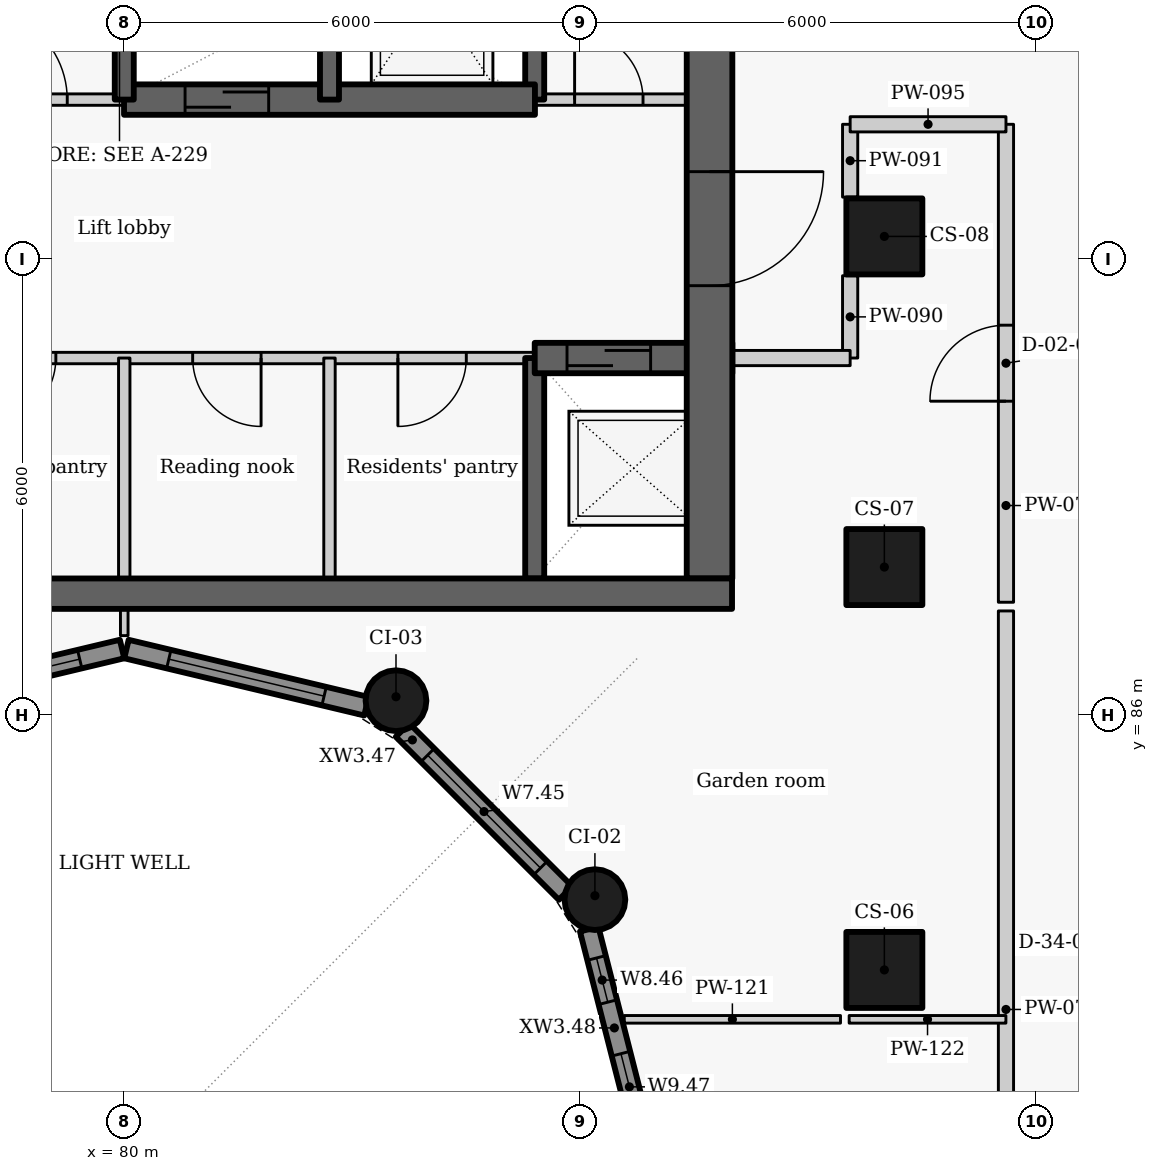
"""IFC4 building model, lengths in metres.
Left out: names, types, materials, properties, quantities, classifications, styles, units other than length and angle.
Written with IfcOpenShell. Run it as: python <this file> out.ifc"""

import sys

from ifc_helpers import new_model, si_unit, direction, frame, frame_2d, origin, origin_2d, place, context, subcontext, project, spatial, rectangle, circle, extrude, element, fill, save


model = new_model("IFC4")
c1 = context("Model", 3, precision=1e-05, world=origin(), true_north=direction((0.0, 1.0)))
c2 = subcontext(c1, "Body", "Model", "MODEL_VIEW")
j1 = project(units=[si_unit("LENGTHUNIT", "METRE"), si_unit("PLANEANGLEUNIT", "RADIAN")], contexts=[c1])
p1 = place(None, origin())
s1 = spatial("IfcSite", under=j1, at=p1, CompositionType="ELEMENT")
p2 = place(p1, origin())
s2 = spatial("IfcBuilding", under=s1, at=p2, CompositionType="ELEMENT")
p3 = place(p2, frame((0.0, 0.0, 166.8)))
s3 = spatial("IfcBuildingStorey", under=s2, at=p3, CompositionType="ELEMENT", Elevation=166.8)
for number, where, z_axis, x_axis in (
    (1, (90.0, 82.65, 0.0), (0.0, 0.0, 1.0), (0.0, 1.0, 0.0)),
    (2, (90.0, 87.95, 0.0), (0.0, 0.0, 1.0), (0.0, 1.0, 0.0)),
    (3, (90.0, 92.3, 0.0), (0.0, 0.0, 1.0), (0.0, 1.0, 0.0)),
):
    element("IfcColumn", number, at=place(p3, frame(where, z_axis=z_axis, x_axis=x_axis)), inside=s3, PredefinedType="COLUMN", context=c2, shape_type="SweptSolid", body=[
        extrude(rectangle(XDim=1.0, YDim=1.0, at=origin_2d()), origin(), (0.0, 0.0, 1.0), 3.3),
    ])
for number, where, z_axis, x_axis in (
    (4, (86.192, 83.575, 0.0), (0.0, 0.0, 1.0), (-0.5, 0.866, 0.0)),
    (5, (83.575, 86.192, 0.0), (0.0, 0.0, 1.0), (-0.866, 0.5, 0.0)),
):
    element("IfcColumn", number, at=place(p3, frame(where, z_axis=z_axis, x_axis=x_axis)), inside=s3, PredefinedType="COLUMN", context=c2, shape_type="SweptSolid", body=[
        extrude(circle(Radius=0.4, at=origin_2d()), origin(), (0.0, 0.0, 1.0), 3.3),
    ])
p4 = place(p3, frame((76.814, 86.119, 0.0), z_axis=(0.0, 0.0, 1.0), x_axis=(0.972773113459, 0.231759508395, 0.0)))
e6 = element("IfcWall", 6, at=p4, inside=s3, PredefinedType="SOLIDWALL", context=c2, shape_type="SweptSolid", body=[
    extrude(rectangle(XDim=3.246, YDim=0.25, at=frame_2d((1.623, 0.0))), origin(), (0.0, 0.0, 1.0), 2.05),
])
p5 = place(p4, frame((0.573, 0.0, 0.9)))
e7 = element("IfcOpeningElement", 7, at=p5, cuts=e6, PredefinedType="OPENING", context=c2, shape_type="SweptSolid", body=[
    extrude(rectangle(XDim=2.1, YDim=1.1, at=frame_2d((1.05, 0.55))), frame((0.0, 0.135, 0.0), z_axis=(0.0, -1.0, 0.0), x_axis=(1.0, 0.0, 0.0)), (0.0, 0.0, 1.0), 0.27),
])
p6 = place(p3, frame((80.029, 86.872, 0.0), z_axis=(0.0, 0.0, 1.0), x_axis=(0.972773113459, -0.231759508395, 0.0)))
e8 = element("IfcWall", 8, at=p6, inside=s3, PredefinedType="SOLIDWALL", context=c2, shape_type="SweptSolid", body=[
    extrude(rectangle(XDim=3.246, YDim=0.25, at=frame_2d((1.623, 0.0))), origin(), (0.0, 0.0, 1.0), 2.05),
])
p7 = place(p6, frame((0.573, 0.0, 0.9)))
e9 = element("IfcOpeningElement", 9, at=p7, cuts=e8, PredefinedType="OPENING", context=c2, shape_type="SweptSolid", body=[
    extrude(rectangle(XDim=2.1, YDim=1.1, at=frame_2d((1.05, 0.55))), frame((0.0, 0.135, 0.0), z_axis=(0.0, -1.0, 0.0), x_axis=(1.0, 0.0, 0.0)), (0.0, 0.0, 1.0), 0.27),
])
p8 = place(p3, frame((83.661, 85.806, 0.0), z_axis=(0.0, 0.0, 1.0), x_axis=(0.707106781187, -0.707106781187, 0.0)))
e10 = element("IfcWall", 10, at=p8, inside=s3, PredefinedType="SOLIDWALL", context=c2, shape_type="SweptSolid", body=[
    extrude(rectangle(XDim=3.033, YDim=0.25, at=frame_2d((1.517, 0.0))), origin(), (0.0, 0.0, 1.0), 2.05),
])
p9 = place(p8, frame((0.467, 0.0, 0.9)))
e11 = element("IfcOpeningElement", 11, at=p9, cuts=e10, PredefinedType="OPENING", context=c2, shape_type="SweptSolid", body=[
    extrude(rectangle(XDim=2.1, YDim=1.1, at=frame_2d((1.05, 0.55))), frame((0.0, 0.135, 0.0), z_axis=(0.0, -1.0, 0.0), x_axis=(1.0, 0.0, 0.0)), (0.0, 0.0, 1.0), 0.27),
])
p10 = place(p3, frame((86.117, 83.187, 0.0), z_axis=(0.0, 0.0, 1.0), x_axis=(0.247055971283, -0.969001211069, 0.0)))
e12 = element("IfcWall", 12, at=p10, inside=s3, PredefinedType="SOLIDWALL", context=c2, shape_type="SweptSolid", body=[
    extrude(rectangle(XDim=3.01, YDim=0.25, at=frame_2d((1.505, 0.0))), origin(), (0.0, 0.0, 1.0), 2.05),
])
p11 = place(p10, frame((0.392, 0.0, 0.9)))
e13 = element("IfcOpeningElement", 13, at=p11, cuts=e12, PredefinedType="OPENING", context=c2, shape_type="SweptSolid", body=[
    extrude(rectangle(XDim=0.6, YDim=1.1, at=frame_2d((0.3, 0.55))), frame((0.0, 0.135, 0.0), z_axis=(0.0, -1.0, 0.0), x_axis=(1.0, 0.0, 0.0)), (0.0, 0.0, 1.0), 0.27),
])
p12 = place(p10, frame((1.691, 0.0, 0.9)))
e14 = element("IfcOpeningElement", 14, at=p12, cuts=e12, PredefinedType="OPENING", context=c2, shape_type="SweptSolid", body=[
    extrude(rectangle(XDim=0.9, YDim=1.1, at=frame_2d((0.45, 0.55))), frame((0.0, 0.135, 0.0), z_axis=(0.0, -1.0, 0.0), x_axis=(1.0, 0.0, 0.0)), (0.0, 0.0, 1.0), 0.27),
])
p13 = place(p3, frame((85.4, 90.7, 0.0), z_axis=(0.0, 0.0, 1.0), x_axis=(-1.0, 0.0, 0.0)))
e15 = element("IfcWall", 15, at=p13, inside=s3, PredefinedType="PARTITIONING", context=c2, shape_type="SweptSolid", body=[
    extrude(rectangle(XDim=13.4, YDim=0.15, at=frame_2d((6.7, 0.0))), origin(), (0.0, 0.0, 1.0), 2.95),
])
p14 = place(p13, frame((11.325, 0.0, 0.0)))
e16 = element("IfcOpeningElement", 16, at=p14, cuts=e15, PredefinedType="OPENING", context=c2, shape_type="SweptSolid", body=[
    extrude(rectangle(XDim=0.9, YDim=2.1, at=frame_2d((0.45, 1.05))), frame((0.0, 0.085, 0.0), z_axis=(0.0, -1.0, 0.0), x_axis=(1.0, 0.0, 0.0)), (0.0, 0.0, 1.0), 0.17),
])
p15 = place(p13, frame((9.0, 0.0, 0.0)))
e17 = element("IfcOpeningElement", 17, at=p15, cuts=e15, PredefinedType="OPENING", context=c2, shape_type="SweptSolid", body=[
    extrude(rectangle(XDim=0.9, YDim=2.1, at=frame_2d((0.45, 1.05))), frame((0.0, 0.085, 0.0), z_axis=(0.0, -1.0, 0.0), x_axis=(1.0, 0.0, 0.0)), (0.0, 0.0, 1.0), 0.17),
])
p16 = place(p13, frame((6.3, 0.0, 0.0)))
e18 = element("IfcOpeningElement", 18, at=p16, cuts=e15, PredefinedType="OPENING", context=c2, shape_type="SweptSolid", body=[
    extrude(rectangle(XDim=0.9, YDim=2.1, at=frame_2d((0.45, 1.05))), frame((0.0, 0.085, 0.0), z_axis=(0.0, -1.0, 0.0), x_axis=(1.0, 0.0, 0.0)), (0.0, 0.0, 1.0), 0.17),
])
p17 = place(p13, frame((3.6, 0.0, 0.0)))
e19 = element("IfcOpeningElement", 19, at=p17, cuts=e15, PredefinedType="OPENING", context=c2, shape_type="SweptSolid", body=[
    extrude(rectangle(XDim=0.9, YDim=2.1, at=frame_2d((0.45, 1.05))), frame((0.0, 0.085, 0.0), z_axis=(0.0, -1.0, 0.0), x_axis=(1.0, 0.0, 0.0)), (0.0, 0.0, 1.0), 0.17),
])
p18 = place(p13, frame((0.9, 0.0, 0.0)))
e20 = element("IfcOpeningElement", 20, at=p18, cuts=e15, PredefinedType="OPENING", context=c2, shape_type="SweptSolid", body=[
    extrude(rectangle(XDim=0.9, YDim=2.1, at=frame_2d((0.45, 1.05))), frame((0.0, 0.085, 0.0), z_axis=(0.0, -1.0, 0.0), x_axis=(1.0, 0.0, 0.0)), (0.0, 0.0, 1.0), 0.17),
])
p19 = place(p3, frame((85.4, 87.8, -0.275), z_axis=(0.0, 0.0, 1.0), x_axis=(0.0, 1.0, 0.0)))
e21 = element("IfcWall", 21, at=p19, inside=s3, PredefinedType="SHEAR", context=c2, shape_type="SweptSolid", body=[
    extrude(rectangle(XDim=2.9, YDim=0.25, at=frame_2d((1.45, 0.0))), origin(), (0.0, 0.0, 1.0), 3.225),
])
p20 = place(p3, frame((85.4, 94.1, -0.275), z_axis=(0.0, 0.0, 1.0), x_axis=(0.0, 1.0, 0.0)))
e22 = element("IfcWall", 22, at=p20, inside=s3, PredefinedType="SHEAR", context=c2, shape_type="SweptSolid", body=[
    extrude(rectangle(XDim=2.8, YDim=0.25, at=frame_2d((1.4, 0.0))), origin(), (0.0, 0.0, 1.0), 3.225),
])
p21 = place(p3, frame((85.4, 90.7, -0.275), z_axis=(0.0, 0.0, 1.0), x_axis=(1.0, 0.0, 0.0)))
e23 = element("IfcWall", 23, at=p21, inside=s3, PredefinedType="SHEAR", context=c2, shape_type="SweptSolid", body=[
    extrude(rectangle(XDim=2.6, YDim=0.4, at=frame_2d((1.3, 0.0))), origin(), (0.0, 0.0, 1.0), 3.225),
])
p22 = place(p21, frame((0.425, 0.0, 0.275)))
e24 = element("IfcOpeningElement", 24, at=p22, cuts=e23, PredefinedType="OPENING", context=c2, shape_type="SweptSolid", body=[
    extrude(rectangle(XDim=1.1, YDim=2.1, at=frame_2d((0.55, 1.05))), frame((0.0, 0.21, 0.0), z_axis=(0.0, -1.0, 0.0), x_axis=(1.0, 0.0, 0.0)), (0.0, 0.0, 1.0), 0.42),
])
p23 = place(p3, frame((87.7, 103.4, -0.275), z_axis=(0.0, 0.0, 1.0), x_axis=(0.0, -1.0, 0.0)))
e25 = element("IfcWall", 25, at=p23, inside=s3, PredefinedType="SHEAR", context=c2, shape_type="SweptSolid", body=[
    extrude(rectangle(XDim=15.6, YDim=0.6, at=frame_2d((7.8, 0.0))), origin(), (0.0, 0.0, 1.0), 3.225),
])
p24 = place(p23, frame((10.248, 0.0, 0.275)))
e26 = element("IfcOpeningElement", 26, at=p24, cuts=e25, PredefinedType="OPENING", context=c2, shape_type="SweptSolid", body=[
    extrude(rectangle(XDim=1.5, YDim=2.1, at=frame_2d((0.75, 1.05))), frame((0.0, 0.31, 0.0), z_axis=(0.0, -1.0, 0.0), x_axis=(1.0, 0.0, 0.0)), (0.0, 0.0, 1.0), 0.62),
])
for number, where, z_axis, x_axis in (
    (27, (80.0, 87.8, 0.0), (0.0, 0.0, 1.0), (0.0, 1.0, 0.0)),
    (28, (82.7, 87.8, 0.0), (0.0, 0.0, 1.0), (0.0, 1.0, 0.0)),
):
    element("IfcWall", number, at=place(p3, frame(where, z_axis=z_axis, x_axis=x_axis)), inside=s3, PredefinedType="PARTITIONING", context=c2, shape_type="SweptSolid", body=[
        extrude(rectangle(XDim=2.9, YDim=0.15, at=frame_2d((1.45, 0.0))), origin(), (0.0, 0.0, 1.0), 2.95),
    ])
p25 = place(p3, frame((77.297, 94.1, 0.0), z_axis=(0.0, 0.0, 1.0), x_axis=(1.0, 0.0, 0.0)))
e29 = element("IfcWall", 29, at=p25, inside=s3, PredefinedType="PARTITIONING", context=c2, shape_type="SweptSolid", body=[
    extrude(rectangle(XDim=2.706, YDim=0.15, at=frame_2d((1.353, 0.0))), origin(), (0.0, 0.0, 1.0), 2.95),
])
p26 = place(p25, frame((0.753, 0.0, 0.0)))
e30 = element("IfcOpeningElement", 30, at=p26, cuts=e29, PredefinedType="OPENING", context=c2, shape_type="SweptSolid", body=[
    extrude(rectangle(XDim=1.2, YDim=2.1, at=frame_2d((0.6, 1.05))), frame((0.0, 0.085, 0.0), z_axis=(0.0, -1.0, 0.0), x_axis=(1.0, 0.0, 0.0)), (0.0, 0.0, 1.0), 0.17),
])
p27 = place(p3, frame((85.397, 94.1, 0.0), z_axis=(0.0, 0.0, 1.0), x_axis=(1.0, 0.0, 0.0)))
e31 = element("IfcWall", 31, at=p27, inside=s3, PredefinedType="PARTITIONING", context=c2, shape_type="SweptSolid", body=[
    extrude(rectangle(XDim=2.603, YDim=0.15, at=frame_2d((1.302, 0.0))), origin(), (0.0, 0.0, 1.0), 2.95),
])
p28 = place(p27, frame((0.528, 0.0, 0.0)))
e32 = element("IfcOpeningElement", 32, at=p28, cuts=e31, PredefinedType="OPENING", context=c2, shape_type="SweptSolid", body=[
    extrude(rectangle(XDim=0.9, YDim=2.1, at=frame_2d((0.45, 1.05))), frame((0.0, 0.085, 0.0), z_axis=(0.0, -1.0, 0.0), x_axis=(1.0, 0.0, 0.0)), (0.0, 0.0, 1.0), 0.17),
])
p29 = place(p3, frame((79.997, 94.1, -0.275), z_axis=(0.0, 0.0, 1.0), x_axis=(1.0, 0.0, 0.0)))
e33 = element("IfcWall", 33, at=p29, inside=s3, PredefinedType="SHEAR", context=c2, shape_type="SweptSolid", body=[
    extrude(rectangle(XDim=5.406, YDim=0.4, at=frame_2d((2.703, 0.0))), origin(), (0.0, 0.0, 1.0), 3.225),
])
p30 = place(p29, frame((0.803, 0.0, 0.275)))
e34 = element("IfcOpeningElement", 34, at=p30, cuts=e33, PredefinedType="OPENING", context=c2, shape_type="SweptSolid", body=[
    extrude(rectangle(XDim=1.1, YDim=2.1, at=frame_2d((0.55, 1.05))), frame((0.0, 0.21, 0.0), z_axis=(0.0, -1.0, 0.0), x_axis=(1.0, 0.0, 0.0)), (0.0, 0.0, 1.0), 0.42),
])
for number, where, z_axis, x_axis in (
    (35, (80.0, 94.1, -0.275), (0.0, 0.0, 1.0), (0.0, 1.0, 0.0)),
    (36, (82.7, 94.1, -0.275), (0.0, 0.0, 1.0), (0.0, 1.0, 0.0)),
):
    element("IfcWall", number, at=place(p3, frame(where, z_axis=z_axis, x_axis=x_axis)), inside=s3, PredefinedType="SHEAR", context=c2, shape_type="SweptSolid", body=[
        extrude(rectangle(XDim=2.8, YDim=0.25, at=frame_2d((1.4, 0.0))), origin(), (0.0, 0.0, 1.0), 3.225),
    ])
p31 = place(p3, frame((91.6, 76.887, 0.0), z_axis=(0.0, 0.0, 1.0), x_axis=(0.0, 1.0, 0.0)))
e37 = element("IfcWall", 37, at=p31, inside=s3, PredefinedType="PARTITIONING", context=c2, shape_type="SweptSolid", body=[
    extrude(rectangle(XDim=10.486, YDim=0.2, at=frame_2d((5.243, 0.0))), origin(), (0.0, 0.0, 1.0), 2.95),
])
p32 = place(p3, frame((91.6, 87.487, 0.0), z_axis=(0.0, 0.0, 1.0), x_axis=(0.0, 1.0, 0.0)))
e38 = element("IfcWall", 38, at=p32, inside=s3, PredefinedType="PARTITIONING", context=c2, shape_type="SweptSolid", body=[
    extrude(rectangle(XDim=6.288, YDim=0.2, at=frame_2d((3.144, 0.0))), origin(), (0.0, 0.0, 1.0), 2.95),
])
p33 = place(p32, frame((2.645, 0.0, 0.0)))
e39 = element("IfcOpeningElement", 39, at=p33, cuts=e38, PredefinedType="OPENING", context=c2, shape_type="SweptSolid", body=[
    extrude(rectangle(XDim=1.0, YDim=2.1, at=frame_2d((0.5, 1.05))), frame((0.0, 0.11, 0.0), z_axis=(0.0, -1.0, 0.0), x_axis=(1.0, 0.0, 0.0)), (0.0, 0.0, 1.0), 0.22),
])
p34 = place(p3, frame((89.55, 90.7, 0.0), z_axis=(0.0, 0.0, 1.0), x_axis=(0.0, 1.0, 0.0)))
e40 = element("IfcWall", 40, at=p34, inside=s3, PredefinedType="PARTITIONING", context=c2, shape_type="SweptSolid", body=[
    extrude(rectangle(XDim=1.083, YDim=0.2, at=frame_2d((0.542, 0.0))), origin(), (0.0, 0.0, 1.0), 2.43),
])
p35 = place(p3, frame((89.55, 92.817, 0.0), z_axis=(0.0, 0.0, 1.0), x_axis=(0.0, 1.0, 0.0)))
e41 = element("IfcWall", 41, at=p35, inside=s3, PredefinedType="PARTITIONING", context=c2, shape_type="SweptSolid", body=[
    extrude(rectangle(XDim=0.958, YDim=0.2, at=frame_2d((0.479, 0.0))), origin(), (0.0, 0.0, 1.0), 2.95),
])
p36 = place(p3, frame((89.55, 93.775, 0.0), z_axis=(0.0, 0.0, 1.0), x_axis=(1.0, 0.0, 0.0)))
e42 = element("IfcWall", 42, at=p36, inside=s3, PredefinedType="PARTITIONING", context=c2, shape_type="SweptSolid", body=[
    extrude(rectangle(XDim=2.05, YDim=0.2, at=frame_2d((1.025, 0.0))), origin(), (0.0, 0.0, 1.0), 2.43),
])
p37 = place(p3, frame((88.0, 90.7, 0.0), z_axis=(0.0, 0.0, 1.0), x_axis=(1.0, 0.0, 0.0)))
e43 = element("IfcWall", 43, at=p37, inside=s3, PredefinedType="PARTITIONING", context=c2, shape_type="SweptSolid", body=[
    extrude(rectangle(XDim=1.55, YDim=0.2, at=frame_2d((0.775, 0.0))), origin(), (0.0, 0.0, 1.0), 2.95),
])
p38 = place(p3, frame((80.0, 87.048, 0.0), z_axis=(0.0, 0.0, 1.0), x_axis=(0.0, 1.0, 0.0)))
e44 = element("IfcWall", 44, at=p38, inside=s3, PredefinedType="PARTITIONING", context=c2, shape_type="SweptSolid", body=[
    extrude(rectangle(XDim=0.352, YDim=0.1, at=frame_2d((0.176, 0.0))), origin(), (0.0, 0.0, 1.0), 2.95),
])
p39 = place(p3, frame((86.578, 82.0, 0.0), z_axis=(0.0, 0.0, 1.0), x_axis=(1.0, 0.0, 0.0)))
e45 = element("IfcWall", 45, at=p39, inside=s3, PredefinedType="PARTITIONING", context=c2, shape_type="SweptSolid", body=[
    extrude(rectangle(XDim=2.845, YDim=0.1, at=frame_2d((1.422, 0.0))), origin(), (0.0, 0.0, 1.0), 2.95),
])
p40 = place(p3, frame((89.537, 82.0, 0.0), z_axis=(0.0, 0.0, 1.0), x_axis=(1.0, 0.0, 0.0)))
e46 = element("IfcWall", 46, at=p40, inside=s3, PredefinedType="PARTITIONING", context=c2, shape_type="SweptSolid", body=[
    extrude(rectangle(XDim=2.062, YDim=0.1, at=frame_2d((1.031, 0.0))), origin(), (0.0, 0.0, 1.0), 2.43),
])
p41 = place(p3, frame((72.004, 87.6, -0.275), z_axis=(0.0, 0.0, 1.0), x_axis=(1.0, 0.0, 0.0)))
e47 = element("IfcWall", 47, at=p41, inside=s3, PredefinedType="SHEAR", context=c2, shape_type="SweptSolid", body=[
    extrude(rectangle(XDim=15.992, YDim=0.4, at=frame_2d((7.996, 0.0))), origin(), (0.0, 0.0, 1.0), 3.225),
])
p42 = place(p5, origin())
e48 = element("IfcWindow", 48, at=p42, inside=s3, PartitioningType="SINGLE_PANEL", PredefinedType="WINDOW", context=c2, shape_type="SweptSolid", body=[
    extrude(rectangle(XDim=2.1, YDim=1.1, at=frame_2d((1.05, 0.55))), frame((0.0, 0.03, 0.0), z_axis=(0.0, -1.0, 0.0), x_axis=(1.0, 0.0, 0.0)), (0.0, 0.0, 1.0), 0.06),
])
fill(e7, e48)
p43 = place(p7, origin())
e49 = element("IfcWindow", 49, at=p43, inside=s3, PartitioningType="SINGLE_PANEL", PredefinedType="WINDOW", context=c2, shape_type="SweptSolid", body=[
    extrude(rectangle(XDim=2.1, YDim=1.1, at=frame_2d((1.05, 0.55))), frame((0.0, 0.03, 0.0), z_axis=(0.0, -1.0, 0.0), x_axis=(1.0, 0.0, 0.0)), (0.0, 0.0, 1.0), 0.06),
])
fill(e9, e49)
p44 = place(p9, origin())
e50 = element("IfcWindow", 50, at=p44, inside=s3, PartitioningType="SINGLE_PANEL", PredefinedType="WINDOW", context=c2, shape_type="SweptSolid", body=[
    extrude(rectangle(XDim=2.1, YDim=1.1, at=frame_2d((1.05, 0.55))), frame((0.0, 0.03, 0.0), z_axis=(0.0, -1.0, 0.0), x_axis=(1.0, 0.0, 0.0)), (0.0, 0.0, 1.0), 0.06),
])
fill(e11, e50)
p45 = place(p11, origin())
e51 = element("IfcWindow", 51, at=p45, inside=s3, PartitioningType="SINGLE_PANEL", PredefinedType="WINDOW", context=c2, shape_type="SweptSolid", body=[
    extrude(rectangle(XDim=0.6, YDim=1.1, at=frame_2d((0.3, 0.55))), frame((0.0, 0.03, 0.0), z_axis=(0.0, -1.0, 0.0), x_axis=(1.0, 0.0, 0.0)), (0.0, 0.0, 1.0), 0.06),
])
fill(e13, e51)
p46 = place(p12, origin())
e52 = element("IfcWindow", 52, at=p46, inside=s3, PartitioningType="SINGLE_PANEL", PredefinedType="WINDOW", context=c2, shape_type="SweptSolid", body=[
    extrude(rectangle(XDim=0.9, YDim=1.1, at=frame_2d((0.45, 0.55))), frame((0.0, 0.03, 0.0), z_axis=(0.0, -1.0, 0.0), x_axis=(1.0, 0.0, 0.0)), (0.0, 0.0, 1.0), 0.06),
])
fill(e14, e52)
p47 = place(p22, origin())
e53 = element("IfcDoor", 53, at=p47, inside=s3, OperationType="SLIDING_TO_LEFT", PredefinedType="DOOR", context=c2, shape_type="SweptSolid", body=[
    extrude(rectangle(XDim=1.1, YDim=2.1, at=frame_2d((0.55, 1.05))), frame((0.0, 0.025, 0.0), z_axis=(0.0, -1.0, 0.0), x_axis=(1.0, 0.0, 0.0)), (0.0, 0.0, 1.0), 0.05),
])
fill(e24, e53)
p48 = place(p16, origin())
e54 = element("IfcDoor", 54, at=p48, inside=s3, OperationType="SINGLE_SWING_RIGHT", PredefinedType="DOOR", context=c2, shape_type="SweptSolid", body=[
    extrude(rectangle(XDim=0.9, YDim=2.1, at=frame_2d((0.45, 1.05))), frame((0.0, 0.025, 0.0), z_axis=(0.0, -1.0, 0.0), x_axis=(1.0, 0.0, 0.0)), (0.0, 0.0, 1.0), 0.05),
])
fill(e18, e54)
p49 = place(p17, origin())
e55 = element("IfcDoor", 55, at=p49, inside=s3, OperationType="SINGLE_SWING_LEFT", PredefinedType="DOOR", context=c2, shape_type="SweptSolid", body=[
    extrude(rectangle(XDim=0.9, YDim=2.1, at=frame_2d((0.45, 1.05))), frame((0.0, 0.025, 0.0), z_axis=(0.0, -1.0, 0.0), x_axis=(1.0, 0.0, 0.0)), (0.0, 0.0, 1.0), 0.05),
])
fill(e19, e55)
p50 = place(p18, origin())
e56 = element("IfcDoor", 56, at=p50, inside=s3, OperationType="SINGLE_SWING_RIGHT", PredefinedType="DOOR", context=c2, shape_type="SweptSolid", body=[
    extrude(rectangle(XDim=0.9, YDim=2.1, at=frame_2d((0.45, 1.05))), frame((0.0, 0.025, 0.0), z_axis=(0.0, -1.0, 0.0), x_axis=(1.0, 0.0, 0.0)), (0.0, 0.0, 1.0), 0.05),
])
fill(e20, e56)
p51 = place(p26, origin())
e57 = element("IfcDoor", 57, at=p51, inside=s3, OperationType="DOUBLE_DOOR_SINGLE_SWING", PredefinedType="DOOR", context=c2, shape_type="SweptSolid", body=[
    extrude(rectangle(XDim=1.2, YDim=2.1, at=frame_2d((0.6, 1.05))), frame((0.0, 0.025, 0.0), z_axis=(0.0, -1.0, 0.0), x_axis=(1.0, 0.0, 0.0)), (0.0, 0.0, 1.0), 0.05),
])
fill(e30, e57)
p52 = place(p30, origin())
e58 = element("IfcDoor", 58, at=p52, inside=s3, OperationType="SLIDING_TO_LEFT", PredefinedType="DOOR", context=c2, shape_type="SweptSolid", body=[
    extrude(rectangle(XDim=1.1, YDim=2.1, at=frame_2d((0.55, 1.05))), frame((0.0, 0.025, 0.0), z_axis=(0.0, -1.0, 0.0), x_axis=(1.0, 0.0, 0.0)), (0.0, 0.0, 1.0), 0.05),
])
fill(e34, e58)
p53 = place(p28, origin())
e59 = element("IfcDoor", 59, at=p53, inside=s3, OperationType="SINGLE_SWING_LEFT", PredefinedType="DOOR", context=c2, shape_type="SweptSolid", body=[
    extrude(rectangle(XDim=0.9, YDim=2.1, at=frame_2d((0.45, 1.05))), frame((0.0, 0.025, 0.0), z_axis=(0.0, -1.0, 0.0), x_axis=(1.0, 0.0, 0.0)), (0.0, 0.0, 1.0), 0.05),
])
fill(e32, e59)
p54 = place(p33, origin())
e60 = element("IfcDoor", 60, at=p54, inside=s3, OperationType="SINGLE_SWING_LEFT", PredefinedType="DOOR", context=c2, shape_type="SweptSolid", body=[
    extrude(rectangle(XDim=1.0, YDim=2.1, at=frame_2d((0.5, 1.05))), frame((0.0, 0.025, 0.0), z_axis=(0.0, -1.0, 0.0), x_axis=(1.0, 0.0, 0.0)), (0.0, 0.0, 1.0), 0.05),
])
fill(e39, e60)
p55 = place(p24, origin())
e61 = element("IfcDoor", 61, at=p55, inside=s3, OperationType="DOUBLE_DOOR_SINGLE_SWING", PredefinedType="DOOR", context=c2, shape_type="SweptSolid", body=[
    extrude(rectangle(XDim=1.5, YDim=2.1, at=frame_2d((0.75, 1.05))), frame((0.0, 0.025, 0.0), z_axis=(0.0, -1.0, 0.0), x_axis=(1.0, 0.0, 0.0)), (0.0, 0.0, 1.0), 0.05),
])
fill(e26, e61)
save(model, sys.argv[1])
